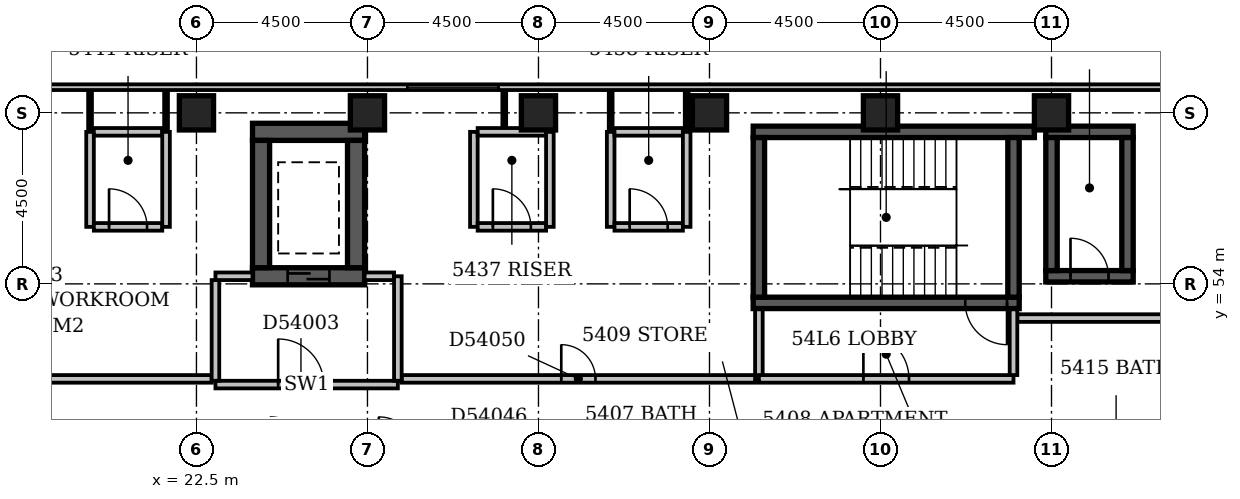
"""IFC4 building model, lengths in metres.
Left out: names, types, materials, properties, quantities, classifications, styles, units other than length and angle.
Written with IfcOpenShell. Run it as: python <this file> out.ifc"""

import sys

from ifc_helpers import new_model, si_unit, direction, frame, frame_2d, origin, origin_2d, place, context, subcontext, project, spatial, rectangle, extrude, element, fill, save


model = new_model("IFC4")
c1 = context("Model", 3, precision=1e-05, world=origin(), true_north=direction((0.0, 1.0)))
c2 = subcontext(c1, "Body", "Model", "MODEL_VIEW")
j1 = project(units=[si_unit("LENGTHUNIT", "METRE"), si_unit("PLANEANGLEUNIT", "RADIAN")], contexts=[c1])
p1 = place(None, origin())
s1 = spatial("IfcSite", under=j1, at=p1, CompositionType="ELEMENT")
p2 = place(p1, origin())
s2 = spatial("IfcBuilding", under=s1, at=p2, CompositionType="ELEMENT")
p3 = place(p2, frame((0.0, 0.0, 211.4)))
s3 = spatial("IfcBuildingStorey", under=s2, at=p3, CompositionType="ELEMENT", Elevation=211.4)
p4 = place(p3, frame((23.975, 54.2, -0.35), z_axis=(0.0, 0.0, 1.0), x_axis=(1.0, 0.0, 0.0)))
e1 = element("IfcWall", 1, at=p4, inside=s3, PredefinedType="SHEAR", context=c2, shape_type="SweptSolid", body=[
    extrude(rectangle(XDim=2.95, YDim=0.45, at=frame_2d((1.475, 0.0))), origin(), (0.0, 0.0, 1.0), 3.65),
])
p5 = place(p4, frame((0.925, 0.0, 0.35)))
e2 = element("IfcOpeningElement", 2, at=p5, cuts=e1, PredefinedType="OPENING", context=c2, shape_type="SweptSolid", body=[
    extrude(rectangle(XDim=1.1, YDim=2.1, at=frame_2d((0.55, 1.05))), frame((0.0, 0.237, 0.0), z_axis=(0.0, -1.0, 0.0), x_axis=(1.0, 0.0, 0.0)), (0.0, 0.0, 1.0), 0.474),
])
p6 = place(p3, frame((23.975, 58.0, -0.35), z_axis=(0.0, 0.0, 1.0), x_axis=(1.0, 0.0, 0.0)))
e3 = element("IfcWall", 3, at=p6, inside=s3, PredefinedType="SHEAR", context=c2, shape_type="SweptSolid", body=[
    extrude(rectangle(XDim=2.95, YDim=0.45, at=frame_2d((1.475, 0.0))), origin(), (0.0, 0.0, 1.0), 3.65),
])
for number, where, z_axis, x_axis in (
    (4, (24.2, 54.425, -0.35), (0.0, 0.0, 1.0), (0.0, 1.0, 0.0)),
    (5, (26.7, 54.425, -0.35), (0.0, 0.0, 1.0), (0.0, 1.0, 0.0)),
):
    element("IfcWall", number, at=place(p3, frame(where, z_axis=z_axis, x_axis=x_axis)), inside=s3, PredefinedType="SHEAR", context=c2, shape_type="SweptSolid", body=[
        extrude(rectangle(XDim=3.35, YDim=0.45, at=frame_2d((1.675, 0.0))), origin(), (0.0, 0.0, 1.0), 3.65),
    ])
p7 = place(p3, frame((37.15, 53.5, -0.35), z_axis=(0.0, 0.0, 1.0), x_axis=(1.0, 0.0, 0.0)))
e6 = element("IfcWall", 6, at=p7, inside=s3, PredefinedType="SHEAR", context=c2, shape_type="SweptSolid", body=[
    extrude(rectangle(XDim=7.0, YDim=0.3, at=frame_2d((3.5, 0.0))), origin(), (0.0, 0.0, 1.0), 3.65),
])
p8 = place(p7, frame((5.58, 0.0, 0.35)))
e7 = element("IfcOpeningElement", 7, at=p8, cuts=e6, PredefinedType="OPENING", context=c2, shape_type="SweptSolid", body=[
    extrude(rectangle(XDim=1.1, YDim=2.1, at=frame_2d((0.55, 1.05))), frame((0.0, 0.162, 0.0), z_axis=(0.0, -1.0, 0.0), x_axis=(1.0, 0.0, 0.0)), (0.0, 0.0, 1.0), 0.324),
])
p9 = place(p3, frame((37.15, 58.0, -0.35), z_axis=(0.0, 0.0, 1.0), x_axis=(1.0, 0.0, 0.0)))
e8 = element("IfcWall", 8, at=p9, inside=s3, PredefinedType="SHEAR", context=c2, shape_type="SweptSolid", body=[
    extrude(rectangle(XDim=7.4, YDim=0.3, at=frame_2d((3.7, 0.0))), origin(), (0.0, 0.0, 1.0), 3.65),
])
for number, where, z_axis, x_axis in (
    (9, (37.3, 53.65, -0.35), (0.0, 0.0, 1.0), (0.0, 1.0, 0.0)),
    (10, (44.0, 53.65, -0.35), (0.0, 0.0, 1.0), (0.0, 1.0, 0.0)),
):
    element("IfcWall", number, at=place(p3, frame(where, z_axis=z_axis, x_axis=x_axis)), inside=s3, PredefinedType="SHEAR", context=c2, shape_type="SweptSolid", body=[
        extrude(rectangle(XDim=4.2, YDim=0.3, at=frame_2d((2.1, 0.0))), origin(), (0.0, 0.0, 1.0), 3.65),
    ])
p10 = place(p3, frame((44.85, 54.2, -0.35), z_axis=(0.0, 0.0, 1.0), x_axis=(1.0, 0.0, 0.0)))
e11 = element("IfcWall", 11, at=p10, inside=s3, PredefinedType="SHEAR", context=c2, shape_type="SweptSolid", body=[
    extrude(rectangle(XDim=2.3, YDim=0.3, at=frame_2d((1.15, 0.0))), origin(), (0.0, 0.0, 1.0), 3.65),
])
p11 = place(p10, frame((0.65, 0.0, 0.35)))
e12 = element("IfcOpeningElement", 12, at=p11, cuts=e11, PredefinedType="OPENING", context=c2, shape_type="SweptSolid", body=[
    extrude(rectangle(XDim=1.0, YDim=2.1, at=frame_2d((0.5, 1.05))), frame((0.0, 0.162, 0.0), z_axis=(0.0, -1.0, 0.0), x_axis=(1.0, 0.0, 0.0)), (0.0, 0.0, 1.0), 0.324),
])
p12 = place(p3, frame((44.85, 58.0, -0.35), z_axis=(0.0, 0.0, 1.0), x_axis=(1.0, 0.0, 0.0)))
e13 = element("IfcWall", 13, at=p12, inside=s3, PredefinedType="SHEAR", context=c2, shape_type="SweptSolid", body=[
    extrude(rectangle(XDim=2.3, YDim=0.3, at=frame_2d((1.15, 0.0))), origin(), (0.0, 0.0, 1.0), 3.65),
])
for number, where, z_axis, x_axis in (
    (14, (45.0, 54.35, -0.35), (0.0, 0.0, 1.0), (0.0, 1.0, 0.0)),
    (15, (47.0, 54.35, -0.35), (0.0, 0.0, 1.0), (0.0, 1.0, 0.0)),
):
    element("IfcWall", number, at=place(p3, frame(where, z_axis=z_axis, x_axis=x_axis)), inside=s3, PredefinedType="SHEAR", context=c2, shape_type="SweptSolid", body=[
        extrude(rectangle(XDim=3.5, YDim=0.3, at=frame_2d((1.75, 0.0))), origin(), (0.0, 0.0, 1.0), 3.65),
    ])
for number, where, z_axis, x_axis in (
    (16, (22.5, 58.5, -0.35), (0.0, 0.0, 1.0), (1.0, 0.0, 0.0)),
    (17, (27.0, 58.5, -0.35), (0.0, 0.0, 1.0), (1.0, 0.0, 0.0)),
    (18, (31.5, 58.5, -0.35), (0.0, 0.0, 1.0), (1.0, 0.0, 0.0)),
    (19, (36.0, 58.5, -0.35), (0.0, 0.0, 1.0), (1.0, 0.0, 0.0)),
    (20, (40.5, 58.5, -0.35), (0.0, 0.0, 1.0), (1.0, 0.0, 0.0)),
    (21, (45.0, 58.5, -0.35), (0.0, 0.0, 1.0), (1.0, 0.0, 0.0)),
):
    element("IfcColumn", number, at=place(p3, frame(where, z_axis=z_axis, x_axis=x_axis)), inside=s3, PredefinedType="COLUMN", context=c2, shape_type="SweptSolid", body=[
        extrude(rectangle(XDim=0.9, YDim=0.9, at=origin_2d()), origin(), (0.0, 0.0, 1.0), 3.65),
    ])
p13 = place(p3, frame((50.1, 59.175, 0.0), z_axis=(0.0, 0.0, 1.0), x_axis=(-1.0, 0.0, 0.0)))
e22 = element("IfcWall", 22, at=p13, inside=s3, PredefinedType="STANDARD", context=c2, shape_type="SweptSolid", body=[
    extrude(rectangle(XDim=50.85, YDim=0.15, at=frame_2d((25.425, 0.0))), origin(), (0.0, 0.0, 1.0), 2.7),
])
p14 = place(p13, frame((19.65, 0.0, 0.6)))
e23 = element("IfcOpeningElement", 23, at=p14, cuts=e22, PredefinedType="OPENING", context=c2, shape_type="SweptSolid", body=[
    extrude(rectangle(XDim=2.4, YDim=1.8, at=frame_2d((1.2, 0.9))), frame((0.0, 0.087, 0.0), z_axis=(0.0, -1.0, 0.0), x_axis=(1.0, 0.0, 0.0)), (0.0, 0.0, 1.0), 0.174),
])
p15 = place(p3, frame((23.0, 51.35, 0.0), z_axis=(0.0, 0.0, 1.0), x_axis=(1.0, 0.0, 0.0)))
e24 = element("IfcWall", 24, at=p15, inside=s3, PredefinedType="PARTITIONING", context=c2, shape_type="SweptSolid", body=[
    extrude(rectangle(XDim=4.8, YDim=0.2, at=frame_2d((2.4, 0.0))), origin(), (0.0, 0.0, 1.0), 3.3),
])
p16 = place(p15, frame((1.65, 0.0, 0.0)))
e25 = element("IfcOpeningElement", 25, at=p16, cuts=e24, PredefinedType="OPENING", context=c2, shape_type="SweptSolid", body=[
    extrude(rectangle(XDim=1.2, YDim=2.1, at=frame_2d((0.6, 1.05))), frame((0.0, 0.112, 0.0), z_axis=(0.0, -1.0, 0.0), x_axis=(1.0, 0.0, 0.0)), (0.0, 0.0, 1.0), 0.224),
])
p17 = place(p3, frame((27.8, 51.45, 0.0), z_axis=(0.0, 0.0, 1.0), x_axis=(0.0, 1.0, 0.0)))
e26 = element("IfcWall", 26, at=p17, inside=s3, PredefinedType="PARTITIONING", context=c2, shape_type="SweptSolid", body=[
    extrude(rectangle(XDim=2.75, YDim=0.2, at=frame_2d((1.375, 0.0))), origin(), (0.0, 0.0, 1.0), 3.3),
])
p18 = place(p3, frame((23.0, 54.2, 0.0), z_axis=(0.0, 0.0, 1.0), x_axis=(1.0, 0.0, 0.0)))
e27 = element("IfcWall", 27, at=p18, inside=s3, PredefinedType="PARTITIONING", context=c2, shape_type="SweptSolid", body=[
    extrude(rectangle(XDim=0.975, YDim=0.2, at=frame_2d((0.488, 0.0))), origin(), (0.0, 0.0, 1.0), 3.3),
])
p19 = place(p3, frame((26.925, 54.2, 0.0), z_axis=(0.0, 0.0, 1.0), x_axis=(1.0, 0.0, 0.0)))
e28 = element("IfcWall", 28, at=p19, inside=s3, PredefinedType="PARTITIONING", context=c2, shape_type="SweptSolid", body=[
    extrude(rectangle(XDim=0.775, YDim=0.2, at=frame_2d((0.387, 0.0))), origin(), (0.0, 0.0, 1.0), 3.3),
])
p20 = place(p3, frame((23.0, 51.45, 0.0), z_axis=(0.0, 0.0, 1.0), x_axis=(0.0, 1.0, 0.0)))
e29 = element("IfcWall", 29, at=p20, inside=s3, PredefinedType="PARTITIONING", context=c2, shape_type="SweptSolid", body=[
    extrude(rectangle(XDim=2.65, YDim=0.2, at=frame_2d((1.325, 0.0))), origin(), (0.0, 0.0, 1.0), 3.3),
])
p21 = place(p3, frame((37.3, 51.5, 0.0), z_axis=(0.0, 0.0, 1.0), x_axis=(1.0, 0.0, 0.0)))
e30 = element("IfcWall", 30, at=p21, inside=s3, PredefinedType="PARTITIONING", context=c2, shape_type="SweptSolid", body=[
    extrude(rectangle(XDim=6.7, YDim=0.2, at=frame_2d((3.35, 0.0))), origin(), (0.0, 0.0, 1.0), 3.3),
])
p22 = place(p21, frame((2.75, 0.0, 0.0)))
e31 = element("IfcOpeningElement", 31, at=p22, cuts=e30, PredefinedType="OPENING", context=c2, shape_type="SweptSolid", body=[
    extrude(rectangle(XDim=1.2, YDim=2.1, at=frame_2d((0.6, 1.05))), frame((0.0, 0.112, 0.0), z_axis=(0.0, -1.0, 0.0), x_axis=(1.0, 0.0, 0.0)), (0.0, 0.0, 1.0), 0.224),
])
for number, where, z_axis, x_axis in (
    (32, (44.0, 51.6, 0.0), (0.0, 0.0, 1.0), (0.0, 1.0, 0.0)),
    (33, (37.3, 51.6, 0.0), (0.0, 0.0, 1.0), (0.0, 1.0, 0.0)),
):
    element("IfcWall", number, at=place(p3, frame(where, z_axis=z_axis, x_axis=x_axis)), inside=s3, PredefinedType="PARTITIONING", context=c2, shape_type="SweptSolid", body=[
        extrude(rectangle(XDim=1.73, YDim=0.2, at=frame_2d((0.865, 0.0))), origin(), (0.0, 0.0, 1.0), 3.3),
    ])
p23 = place(p3, frame((7.6, 51.5, 0.0), z_axis=(0.0, 0.0, 1.0), x_axis=(1.0, 0.0, 0.0)))
e34 = element("IfcWall", 34, at=p23, inside=s3, PredefinedType="PARTITIONING", context=c2, shape_type="SweptSolid", body=[
    extrude(rectangle(XDim=15.3, YDim=0.2, at=frame_2d((7.65, 0.0))), origin(), (0.0, 0.0, 1.0), 3.3),
])
p24 = place(p23, frame((7.2, 0.0, 0.0)))
e35 = element("IfcOpeningElement", 35, at=p24, cuts=e34, PredefinedType="OPENING", context=c2, shape_type="SweptSolid", body=[
    extrude(rectangle(XDim=0.9, YDim=2.1, at=frame_2d((0.45, 1.05))), frame((0.0, 0.112, 0.0), z_axis=(0.0, -1.0, 0.0), x_axis=(1.0, 0.0, 0.0)), (0.0, 0.0, 1.0), 0.224),
])
p25 = place(p3, frame((27.9, 51.5, 0.0), z_axis=(0.0, 0.0, 1.0), x_axis=(1.0, 0.0, 0.0)))
e36 = element("IfcWall", 36, at=p25, inside=s3, PredefinedType="PARTITIONING", context=c2, shape_type="SweptSolid", body=[
    extrude(rectangle(XDim=9.3, YDim=0.2, at=frame_2d((4.65, 0.0))), origin(), (0.0, 0.0, 1.0), 3.3),
])
p26 = place(p25, frame((4.2, 0.0, 0.0)))
e37 = element("IfcOpeningElement", 37, at=p26, cuts=e36, PredefinedType="OPENING", context=c2, shape_type="SweptSolid", body=[
    extrude(rectangle(XDim=0.9, YDim=2.1, at=frame_2d((0.45, 1.05))), frame((0.0, 0.112, 0.0), z_axis=(0.0, -1.0, 0.0), x_axis=(1.0, 0.0, 0.0)), (0.0, 0.0, 1.0), 0.224),
])
p27 = place(p3, frame((44.1, 53.1, 0.0), z_axis=(0.0, 0.0, 1.0), x_axis=(1.0, 0.0, 0.0)))
e38 = element("IfcWall", 38, at=p27, inside=s3, PredefinedType="PARTITIONING", context=c2, shape_type="SweptSolid", body=[
    extrude(rectangle(XDim=10.5, YDim=0.2, at=frame_2d((5.25, 0.0))), origin(), (0.0, 0.0, 1.0), 3.3),
])
p28 = place(p27, frame((4.45, 0.0, 0.0)))
e39 = element("IfcOpeningElement", 39, at=p28, cuts=e38, PredefinedType="OPENING", context=c2, shape_type="SweptSolid", body=[
    extrude(rectangle(XDim=0.9, YDim=2.1, at=frame_2d((0.45, 1.05))), frame((0.0, 0.112, 0.0), z_axis=(0.0, -1.0, 0.0), x_axis=(1.0, 0.0, 0.0)), (0.0, 0.0, 1.0), 0.224),
])
p29 = place(p3, frame((19.7, 55.5, 0.0), z_axis=(0.0, 0.0, 1.0), x_axis=(0.0, 1.0, 0.0)))
e40 = element("IfcWall", 40, at=p29, inside=s3, PredefinedType="PARTITIONING", context=c2, shape_type="SweptSolid", body=[
    extrude(rectangle(XDim=2.5, YDim=0.2, at=frame_2d((1.25, 0.0))), origin(), (0.0, 0.0, 1.0), 3.3),
])
p30 = place(p3, frame((19.8, 55.5, 0.0), z_axis=(0.0, 0.0, 1.0), x_axis=(1.0, 0.0, 0.0)))
e41 = element("IfcWall", 41, at=p30, inside=s3, PredefinedType="PARTITIONING", context=c2, shape_type="SweptSolid", body=[
    extrude(rectangle(XDim=1.8, YDim=0.2, at=frame_2d((0.9, 0.0))), origin(), (0.0, 0.0, 1.0), 3.3),
])
p31 = place(p30, frame((0.4, 0.0, 0.0)))
e42 = element("IfcOpeningElement", 42, at=p31, cuts=e41, PredefinedType="OPENING", context=c2, shape_type="SweptSolid", body=[
    extrude(rectangle(XDim=1.0, YDim=2.1, at=frame_2d((0.5, 1.05))), frame((0.0, 0.112, 0.0), z_axis=(0.0, -1.0, 0.0), x_axis=(1.0, 0.0, 0.0)), (0.0, 0.0, 1.0), 0.224),
])
for number, where, z_axis, x_axis in (
    (43, (21.7, 55.5, 0.0), (0.0, 0.0, 1.0), (0.0, 1.0, 0.0)),
    (44, (29.8, 55.5, 0.0), (0.0, 0.0, 1.0), (0.0, 1.0, 0.0)),
):
    element("IfcWall", number, at=place(p3, frame(where, z_axis=z_axis, x_axis=x_axis)), inside=s3, PredefinedType="PARTITIONING", context=c2, shape_type="SweptSolid", body=[
        extrude(rectangle(XDim=2.5, YDim=0.2, at=frame_2d((1.25, 0.0))), origin(), (0.0, 0.0, 1.0), 3.3),
    ])
p32 = place(p3, frame((29.9, 55.5, 0.0), z_axis=(0.0, 0.0, 1.0), x_axis=(1.0, 0.0, 0.0)))
e45 = element("IfcWall", 45, at=p32, inside=s3, PredefinedType="PARTITIONING", context=c2, shape_type="SweptSolid", body=[
    extrude(rectangle(XDim=1.8, YDim=0.2, at=frame_2d((0.9, 0.0))), origin(), (0.0, 0.0, 1.0), 3.3),
])
p33 = place(p32, frame((0.4, 0.0, 0.0)))
e46 = element("IfcOpeningElement", 46, at=p33, cuts=e45, PredefinedType="OPENING", context=c2, shape_type="SweptSolid", body=[
    extrude(rectangle(XDim=1.0, YDim=2.1, at=frame_2d((0.5, 1.05))), frame((0.0, 0.112, 0.0), z_axis=(0.0, -1.0, 0.0), x_axis=(1.0, 0.0, 0.0)), (0.0, 0.0, 1.0), 0.224),
])
for number, where, z_axis, x_axis in (
    (47, (31.8, 55.5, 0.0), (0.0, 0.0, 1.0), (0.0, 1.0, 0.0)),
    (48, (33.4, 55.5, 0.0), (0.0, 0.0, 1.0), (0.0, 1.0, 0.0)),
):
    element("IfcWall", number, at=place(p3, frame(where, z_axis=z_axis, x_axis=x_axis)), inside=s3, PredefinedType="PARTITIONING", context=c2, shape_type="SweptSolid", body=[
        extrude(rectangle(XDim=2.5, YDim=0.2, at=frame_2d((1.25, 0.0))), origin(), (0.0, 0.0, 1.0), 3.3),
    ])
p34 = place(p3, frame((33.5, 55.5, 0.0), z_axis=(0.0, 0.0, 1.0), x_axis=(1.0, 0.0, 0.0)))
e49 = element("IfcWall", 49, at=p34, inside=s3, PredefinedType="PARTITIONING", context=c2, shape_type="SweptSolid", body=[
    extrude(rectangle(XDim=1.8, YDim=0.2, at=frame_2d((0.9, 0.0))), origin(), (0.0, 0.0, 1.0), 3.3),
])
p35 = place(p34, frame((0.4, 0.0, 0.0)))
e50 = element("IfcOpeningElement", 50, at=p35, cuts=e49, PredefinedType="OPENING", context=c2, shape_type="SweptSolid", body=[
    extrude(rectangle(XDim=1.0, YDim=2.1, at=frame_2d((0.5, 1.05))), frame((0.0, 0.112, 0.0), z_axis=(0.0, -1.0, 0.0), x_axis=(1.0, 0.0, 0.0)), (0.0, 0.0, 1.0), 0.224),
])
p36 = place(p3, frame((35.4, 55.5, 0.0), z_axis=(0.0, 0.0, 1.0), x_axis=(0.0, 1.0, 0.0)))
e51 = element("IfcWall", 51, at=p36, inside=s3, PredefinedType="PARTITIONING", context=c2, shape_type="SweptSolid", body=[
    extrude(rectangle(XDim=2.5, YDim=0.2, at=frame_2d((1.25, 0.0))), origin(), (0.0, 0.0, 1.0), 2.4),
])
p37 = place(p3, frame((19.7, 58.0, 0.0), z_axis=(0.0, 0.0, 1.0), x_axis=(0.0, 1.0, 0.0)))
e52 = element("IfcWall", 52, at=p37, inside=s3, PredefinedType="PARTITIONING", context=c2, shape_type="SweptSolid", body=[
    extrude(rectangle(XDim=1.1, YDim=0.1, at=frame_2d((0.55, 0.0))), origin(), (0.0, 0.0, 1.0), 3.3),
])
p38 = place(p3, frame((19.8, 58.0, 0.0), z_axis=(0.0, 0.0, 1.0), x_axis=(1.0, 0.0, 0.0)))
e53 = element("IfcWall", 53, at=p38, inside=s3, PredefinedType="PARTITIONING", context=c2, shape_type="SweptSolid", body=[
    extrude(rectangle(XDim=1.8, YDim=0.2, at=frame_2d((0.9, 0.0))), origin(), (0.0, 0.0, 1.0), 3.3),
])
p39 = place(p3, frame((21.7, 58.0, 0.0), z_axis=(0.0, 0.0, 1.0), x_axis=(0.0, 1.0, 0.0)))
e54 = element("IfcWall", 54, at=p39, inside=s3, PredefinedType="PARTITIONING", context=c2, shape_type="SweptSolid", body=[
    extrude(rectangle(XDim=1.1, YDim=0.1, at=frame_2d((0.55, 0.0))), origin(), (0.0, 0.0, 1.0), 3.3),
])
p40 = place(p3, frame((29.9, 58.0, 0.0), z_axis=(0.0, 0.0, 1.0), x_axis=(1.0, 0.0, 0.0)))
e55 = element("IfcWall", 55, at=p40, inside=s3, PredefinedType="PARTITIONING", context=c2, shape_type="SweptSolid", body=[
    extrude(rectangle(XDim=1.8, YDim=0.2, at=frame_2d((0.9, 0.0))), origin(), (0.0, 0.0, 1.0), 3.3),
])
p41 = place(p3, frame((33.4, 58.0, 0.0), z_axis=(0.0, 0.0, 1.0), x_axis=(0.0, 1.0, 0.0)))
e56 = element("IfcWall", 56, at=p41, inside=s3, PredefinedType="PARTITIONING", context=c2, shape_type="SweptSolid", body=[
    extrude(rectangle(XDim=1.1, YDim=0.1, at=frame_2d((0.55, 0.0))), origin(), (0.0, 0.0, 1.0), 3.3),
])
p42 = place(p3, frame((33.5, 58.0, 0.0), z_axis=(0.0, 0.0, 1.0), x_axis=(1.0, 0.0, 0.0)))
e57 = element("IfcWall", 57, at=p42, inside=s3, PredefinedType="PARTITIONING", context=c2, shape_type="SweptSolid", body=[
    extrude(rectangle(XDim=1.8, YDim=0.2, at=frame_2d((0.9, 0.0))), origin(), (0.0, 0.0, 1.0), 3.3),
])
p43 = place(p3, frame((35.4, 58.0, 0.0), z_axis=(0.0, 0.0, 1.0), x_axis=(0.0, 1.0, 0.0)))
e58 = element("IfcWall", 58, at=p43, inside=s3, PredefinedType="PARTITIONING", context=c2, shape_type="SweptSolid", body=[
    extrude(rectangle(XDim=1.1, YDim=0.1, at=frame_2d((0.55, 0.0))), origin(), (0.0, 0.0, 1.0), 2.4),
])
p44 = place(p3, frame((30.6, 58.1, 0.0), z_axis=(0.0, 0.0, 1.0), x_axis=(0.0, 1.0, 0.0)))
e59 = element("IfcWall", 59, at=p44, inside=s3, PredefinedType="PARTITIONING", context=c2, shape_type="SweptSolid", body=[
    extrude(rectangle(XDim=1.0, YDim=0.1, at=frame_2d((0.5, 0.0))), origin(), (0.0, 0.0, 1.0), 3.3),
])
p45 = place(p14, origin())
e60 = element("IfcWindow", 60, at=p45, inside=s3, PartitioningType="SINGLE_PANEL", PredefinedType="WINDOW", context=c2, shape_type="SweptSolid", body=[
    extrude(rectangle(XDim=2.4, YDim=1.8, at=frame_2d((1.2, 0.9))), frame((0.0, 0.03, 0.0), z_axis=(0.0, -1.0, 0.0), x_axis=(1.0, 0.0, 0.0)), (0.0, 0.0, 1.0), 0.06),
])
fill(e23, e60)
p46 = place(p16, origin())
e61 = element("IfcDoor", 61, at=p46, inside=s3, OperationType="SINGLE_SWING_LEFT", PredefinedType="DOOR", context=c2, shape_type="SweptSolid", body=[
    extrude(rectangle(XDim=1.2, YDim=2.1, at=frame_2d((0.6, 1.05))), frame((0.0, 0.025, 0.0), z_axis=(0.0, -1.0, 0.0), x_axis=(1.0, 0.0, 0.0)), (0.0, 0.0, 1.0), 0.05),
])
fill(e25, e61)
p47 = place(p5, origin())
e62 = element("IfcDoor", 62, at=p47, inside=s3, OperationType="SLIDING_TO_LEFT", PredefinedType="DOOR", context=c2, shape_type="SweptSolid", body=[
    extrude(rectangle(XDim=1.1, YDim=2.1, at=frame_2d((0.55, 1.05))), frame((0.0, 0.025, 0.0), z_axis=(0.0, -1.0, 0.0), x_axis=(1.0, 0.0, 0.0)), (0.0, 0.0, 1.0), 0.05),
])
fill(e2, e62)
p48 = place(p22, origin())
e63 = element("IfcDoor", 63, at=p48, inside=s3, OperationType="SINGLE_SWING_LEFT", PredefinedType="DOOR", context=c2, shape_type="SweptSolid", body=[
    extrude(rectangle(XDim=1.2, YDim=2.1, at=frame_2d((0.6, 1.05))), frame((0.0, 0.025, 0.0), z_axis=(0.0, -1.0, 0.0), x_axis=(1.0, 0.0, 0.0)), (0.0, 0.0, 1.0), 0.05),
])
fill(e31, e63)
p49 = place(p11, origin())
e64 = element("IfcDoor", 64, at=p49, inside=s3, OperationType="SINGLE_SWING_LEFT", PredefinedType="DOOR", context=c2, shape_type="SweptSolid", body=[
    extrude(rectangle(XDim=1.0, YDim=2.1, at=frame_2d((0.5, 1.05))), frame((0.0, 0.025, 0.0), z_axis=(0.0, -1.0, 0.0), x_axis=(1.0, 0.0, 0.0)), (0.0, 0.0, 1.0), 0.05),
])
fill(e12, e64)
p50 = place(p8, origin())
e65 = element("IfcDoor", 65, at=p50, inside=s3, OperationType="SINGLE_SWING_RIGHT", PredefinedType="DOOR", context=c2, shape_type="SweptSolid", body=[
    extrude(rectangle(XDim=1.1, YDim=2.1, at=frame_2d((0.55, 1.05))), frame((0.0, 0.025, 0.0), z_axis=(0.0, -1.0, 0.0), x_axis=(1.0, 0.0, 0.0)), (0.0, 0.0, 1.0), 0.05),
])
fill(e7, e65)
p51 = place(p26, origin())
e66 = element("IfcDoor", 66, at=p51, inside=s3, OperationType="SINGLE_SWING_LEFT", PredefinedType="DOOR", context=c2, shape_type="SweptSolid", body=[
    extrude(rectangle(XDim=0.9, YDim=2.1, at=frame_2d((0.45, 1.05))), frame((0.0, 0.025, 0.0), z_axis=(0.0, -1.0, 0.0), x_axis=(1.0, 0.0, 0.0)), (0.0, 0.0, 1.0), 0.05),
])
fill(e37, e66)
p52 = place(p31, origin())
e67 = element("IfcDoor", 67, at=p52, inside=s3, OperationType="SINGLE_SWING_LEFT", PredefinedType="DOOR", context=c2, shape_type="SweptSolid", body=[
    extrude(rectangle(XDim=1.0, YDim=2.1, at=frame_2d((0.5, 1.05))), frame((0.0, 0.025, 0.0), z_axis=(0.0, -1.0, 0.0), x_axis=(1.0, 0.0, 0.0)), (0.0, 0.0, 1.0), 0.05),
])
fill(e42, e67)
p53 = place(p33, origin())
e68 = element("IfcDoor", 68, at=p53, inside=s3, OperationType="SINGLE_SWING_LEFT", PredefinedType="DOOR", context=c2, shape_type="SweptSolid", body=[
    extrude(rectangle(XDim=1.0, YDim=2.1, at=frame_2d((0.5, 1.05))), frame((0.0, 0.025, 0.0), z_axis=(0.0, -1.0, 0.0), x_axis=(1.0, 0.0, 0.0)), (0.0, 0.0, 1.0), 0.05),
])
fill(e46, e68)
p54 = place(p35, origin())
e69 = element("IfcDoor", 69, at=p54, inside=s3, OperationType="SINGLE_SWING_LEFT", PredefinedType="DOOR", context=c2, shape_type="SweptSolid", body=[
    extrude(rectangle(XDim=1.0, YDim=2.1, at=frame_2d((0.5, 1.05))), frame((0.0, 0.025, 0.0), z_axis=(0.0, -1.0, 0.0), x_axis=(1.0, 0.0, 0.0)), (0.0, 0.0, 1.0), 0.05),
])
fill(e50, e69)
save(model, sys.argv[1])
